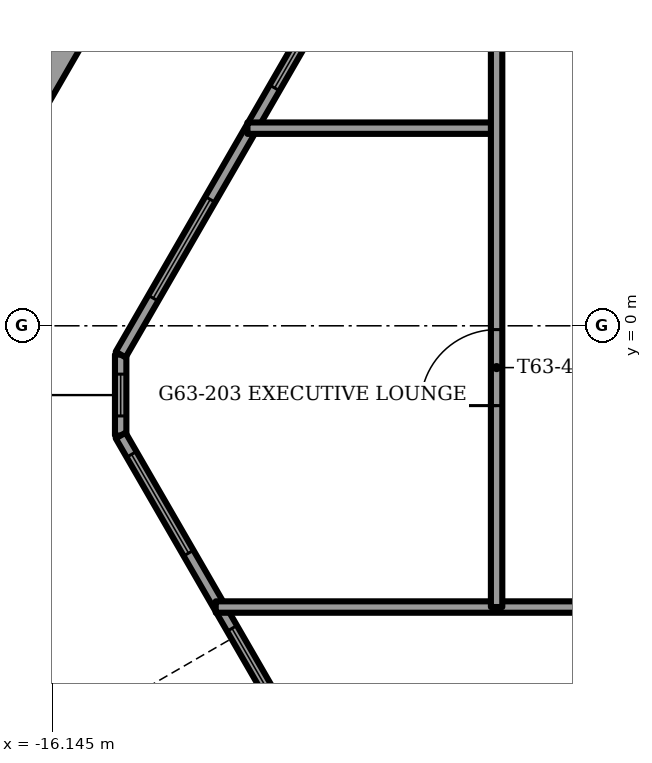
"""IFC4 building model, lengths in metres.
Left out: names, types, materials, properties, quantities, classifications, styles, units other than length and angle.
Written with IfcOpenShell. Run it as: python <this file> out.ifc"""

import sys

from ifc_helpers import new_model, si_unit, direction, frame, frame_2d, origin, place, context, subcontext, project, spatial, rectangle, extrude, element, fill, save


model = new_model("IFC4")
c1 = context("Model", 3, precision=1e-05, world=origin(), true_north=direction((0.0, 1.0)))
c2 = subcontext(c1, "Body", "Model", "MODEL_VIEW")
j1 = project(units=[si_unit("LENGTHUNIT", "METRE"), si_unit("PLANEANGLEUNIT", "RADIAN")], contexts=[c1])
p1 = place(None, origin())
s1 = spatial("IfcSite", under=j1, at=p1, CompositionType="ELEMENT")
p2 = place(p1, origin())
s2 = spatial("IfcBuilding", under=s1, at=p2, CompositionType="ELEMENT")
p3 = place(p2, frame((0.0, 0.0, 256.25)))
s3 = spatial("IfcBuildingStorey", under=s2, at=p3, CompositionType="ELEMENT", Elevation=256.25)
p4 = place(p3, frame((-15.678, 4.722, 0.0), z_axis=(0.0, 0.0, 1.0), x_axis=(-0.499996383721, -0.866027491634, 0.0)))
e1 = element("IfcWall", 1, at=p4, inside=s3, PredefinedType="PARAPET", context=c2, shape_type="SweptSolid", body=[
    extrude(rectangle(XDim=6.018, YDim=0.9, at=frame_2d((3.009, 0.0))), origin(), (0.0, 0.0, 1.0), 1.1),
])
p5 = place(p3, frame((-18.687, -1.333, 0.0), z_axis=(0.0, 0.0, 1.0), x_axis=(0.499971567444, -0.866041818706, 0.0)))
e2 = element("IfcWall", 2, at=p5, inside=s3, PredefinedType="PARAPET", context=c2, shape_type="SweptSolid", body=[
    extrude(rectangle(XDim=4.44, YDim=0.9, at=frame_2d((2.22, 0.0))), origin(), (0.0, 0.0, 1.0), 1.1),
])
p6 = place(p3, frame((-5.909, 15.792, 0.0), z_axis=(0.0, 0.0, 1.0), x_axis=(-0.500006153997, -0.866021850744, 0.0)))
e3 = element("IfcWall", 3, at=p6, inside=s3, PredefinedType="SOLIDWALL", context=c2, shape_type="SweptSolid", body=[
    extrude(rectangle(XDim=18.673, YDim=0.15, at=frame_2d((9.336, 0.0))), origin(), (0.0, 0.0, 1.0), 3.45),
])
p7 = place(p6, frame((2.838, 0.0, 0.15)))
e4 = element("IfcOpeningElement", 4, at=p7, cuts=e3, PredefinedType="OPENING", context=c2, shape_type="SweptSolid", body=[
    extrude(rectangle(XDim=1.5, YDim=2.85, at=frame_2d((0.75, 1.425))), frame((0.0, 0.075, 0.0), z_axis=(0.0, -1.0, 0.0), x_axis=(1.0, 0.0, 0.0)), (0.0, 0.0, 1.0), 0.15),
])
p8 = place(p6, frame((9.053, 0.0, 0.15)))
e5 = element("IfcOpeningElement", 5, at=p8, cuts=e3, PredefinedType="OPENING", context=c2, shape_type="SweptSolid", body=[
    extrude(rectangle(XDim=0.9, YDim=2.85, at=frame_2d((0.45, 1.425))), frame((0.0, 0.075, 0.0), z_axis=(0.0, -1.0, 0.0), x_axis=(1.0, 0.0, 0.0)), (0.0, 0.0, 1.0), 0.15),
])
p9 = place(p6, frame((6.953, 0.0, 0.15)))
e6 = element("IfcOpeningElement", 6, at=p9, cuts=e3, PredefinedType="OPENING", context=c2, shape_type="SweptSolid", body=[
    extrude(rectangle(XDim=1.4, YDim=2.85, at=frame_2d((0.7, 1.425))), frame((0.0, 0.075, 0.0), z_axis=(0.0, -1.0, 0.0), x_axis=(1.0, 0.0, 0.0)), (0.0, 0.0, 1.0), 0.15),
])
p10 = place(p6, frame((11.022, 0.0, 0.15)))
e7 = element("IfcOpeningElement", 7, at=p10, cuts=e3, PredefinedType="OPENING", context=c2, shape_type="SweptSolid", body=[
    extrude(rectangle(XDim=1.5, YDim=2.85, at=frame_2d((0.75, 1.425))), frame((0.0, 0.075, 0.0), z_axis=(0.0, -1.0, 0.0), x_axis=(1.0, 0.0, 0.0)), (0.0, 0.0, 1.0), 0.15),
])
p11 = place(p6, frame((13.222, 0.0, 0.15)))
e8 = element("IfcOpeningElement", 8, at=p11, cuts=e3, PredefinedType="OPENING", context=c2, shape_type="SweptSolid", body=[
    extrude(rectangle(XDim=1.4, YDim=2.85, at=frame_2d((0.7, 1.425))), frame((0.0, 0.075, 0.0), z_axis=(0.0, -1.0, 0.0), x_axis=(1.0, 0.0, 0.0)), (0.0, 0.0, 1.0), 0.15),
])
p12 = place(p6, frame((0.394, 0.0, 0.15)))
e9 = element("IfcOpeningElement", 9, at=p12, cuts=e3, PredefinedType="OPENING", context=c2, shape_type="SweptSolid", body=[
    extrude(rectangle(XDim=1.5, YDim=2.73, at=frame_2d((0.75, 1.365))), frame((0.0, 0.075, 0.0), z_axis=(0.0, -1.0, 0.0), x_axis=(1.0, 0.0, 0.0)), (0.0, 0.0, 1.0), 0.15),
])
p13 = place(p6, frame((16.316, 0.0, 0.15)))
e10 = element("IfcOpeningElement", 10, at=p13, cuts=e3, PredefinedType="OPENING", context=c2, shape_type="SweptSolid", body=[
    extrude(rectangle(XDim=1.5, YDim=2.73, at=frame_2d((0.75, 1.365))), frame((0.0, 0.075, 0.0), z_axis=(0.0, -1.0, 0.0), x_axis=(1.0, 0.0, 0.0)), (0.0, 0.0, 1.0), 0.15),
])
p14 = place(p3, frame((-15.246, -1.444, 0.0), z_axis=(0.0, 0.0, 1.0), x_axis=(0.500005990458, -0.866021945164, 0.0)))
e11 = element("IfcWall", 11, at=p14, inside=s3, PredefinedType="SOLIDWALL", context=c2, shape_type="SweptSolid", body=[
    extrude(rectangle(XDim=12.745, YDim=0.15, at=frame_2d((6.373, 0.0))), origin(), (0.0, 0.0, 1.0), 3.45),
])
p15 = place(p14, frame((2.93, 0.0, 0.15)))
e12 = element("IfcOpeningElement", 12, at=p15, cuts=e11, PredefinedType="OPENING", context=c2, shape_type="SweptSolid", body=[
    extrude(rectangle(XDim=1.5, YDim=2.85, at=frame_2d((0.75, 1.425))), frame((0.0, 0.075, 0.0), z_axis=(0.0, -1.0, 0.0), x_axis=(1.0, 0.0, 0.0)), (0.0, 0.0, 1.0), 0.15),
])
p16 = place(p14, frame((4.673, 0.0, 0.15)))
e13 = element("IfcOpeningElement", 13, at=p16, cuts=e11, PredefinedType="OPENING", context=c2, shape_type="SweptSolid", body=[
    extrude(rectangle(XDim=1.4, YDim=2.85, at=frame_2d((0.7, 1.425))), frame((0.0, 0.075, 0.0), z_axis=(0.0, -1.0, 0.0), x_axis=(1.0, 0.0, 0.0)), (0.0, 0.0, 1.0), 0.15),
])
p17 = place(p14, frame((6.673, 0.0, 0.15)))
e14 = element("IfcOpeningElement", 14, at=p17, cuts=e11, PredefinedType="OPENING", context=c2, shape_type="SweptSolid", body=[
    extrude(rectangle(XDim=1.5, YDim=2.85, at=frame_2d((0.75, 1.425))), frame((0.0, 0.075, 0.0), z_axis=(0.0, -1.0, 0.0), x_axis=(1.0, 0.0, 0.0)), (0.0, 0.0, 1.0), 0.15),
])
p18 = place(p14, frame((8.873, 0.0, 0.15)))
e15 = element("IfcOpeningElement", 15, at=p18, cuts=e11, PredefinedType="OPENING", context=c2, shape_type="SweptSolid", body=[
    extrude(rectangle(XDim=1.4, YDim=2.85, at=frame_2d((0.7, 1.425))), frame((0.0, 0.075, 0.0), z_axis=(0.0, -1.0, 0.0), x_axis=(1.0, 0.0, 0.0)), (0.0, 0.0, 1.0), 0.15),
])
p19 = place(p14, frame((0.286, 0.0, 0.15)))
e16 = element("IfcOpeningElement", 16, at=p19, cuts=e11, PredefinedType="OPENING", context=c2, shape_type="SweptSolid", body=[
    extrude(rectangle(XDim=1.5, YDim=2.73, at=frame_2d((0.75, 1.365))), frame((0.0, 0.075, 0.0), z_axis=(0.0, -1.0, 0.0), x_axis=(1.0, 0.0, 0.0)), (0.0, 0.0, 1.0), 0.15),
])
p20 = place(p3, frame((-15.246, -0.378, 0.0), z_axis=(0.0, 0.0, 1.0), x_axis=(0.0, -1.0, 0.0)))
e17 = element("IfcWall", 17, at=p20, inside=s3, PredefinedType="SOLIDWALL", context=c2, shape_type="SweptSolid", body=[
    extrude(rectangle(XDim=1.065, YDim=0.15, at=frame_2d((0.533, 0.0))), origin(), (0.0, 0.0, 1.0), 3.45),
])
p21 = place(p20, frame((0.258, 0.0, 0.15)))
e18 = element("IfcOpeningElement", 18, at=p21, cuts=e17, PredefinedType="OPENING", context=c2, shape_type="SweptSolid", body=[
    extrude(rectangle(XDim=0.55, YDim=2.85, at=frame_2d((0.275, 1.425))), frame((0.0, 0.075, 0.0), z_axis=(0.0, -1.0, 0.0), x_axis=(1.0, 0.0, 0.0)), (0.0, 0.0, 1.0), 0.15),
])
p22 = place(p3, frame((-13.995, -3.7, 0.0), z_axis=(0.0, 0.0, 1.0), x_axis=(1.0, 0.0, 0.0)))
e19 = element("IfcWall", 19, at=p22, inside=s3, PredefinedType="PARTITIONING", context=c2, shape_type="SweptSolid", body=[
    extrude(rectangle(XDim=19.785, YDim=0.15, at=frame_2d((9.893, 0.0))), origin(), (0.0, 0.0, 1.0), 3.45),
])
p23 = place(p22, frame((13.495, 0.0, 0.0)))
e20 = element("IfcOpeningElement", 20, at=p23, cuts=e19, PredefinedType="OPENING", context=c2, shape_type="SweptSolid", body=[
    extrude(rectangle(XDim=1.0, YDim=2.1, at=frame_2d((0.5, 1.05))), frame((0.0, 0.075, 0.0), z_axis=(0.0, -1.0, 0.0), x_axis=(1.0, 0.0, 0.0)), (0.0, 0.0, 1.0), 0.15),
])
p24 = place(p22, frame((7.27, 0.0, 0.0)))
e21 = element("IfcOpeningElement", 21, at=p24, cuts=e19, PredefinedType="OPENING", context=c2, shape_type="SweptSolid", body=[
    extrude(rectangle(XDim=1.0, YDim=2.1, at=frame_2d((0.5, 1.05))), frame((0.0, 0.075, 0.0), z_axis=(0.0, -1.0, 0.0), x_axis=(1.0, 0.0, 0.0)), (0.0, 0.0, 1.0), 0.15),
])
p25 = place(p22, frame((17.445, 0.0, 0.0)))
e22 = element("IfcOpeningElement", 22, at=p25, cuts=e19, PredefinedType="OPENING", context=c2, shape_type="SweptSolid", body=[
    extrude(rectangle(XDim=1.0, YDim=2.1, at=frame_2d((0.5, 1.05))), frame((0.0, 0.075, 0.0), z_axis=(0.0, -1.0, 0.0), x_axis=(1.0, 0.0, 0.0)), (0.0, 0.0, 1.0), 0.15),
])
p26 = place(p3, frame((-13.578, 2.6, 0.0), z_axis=(0.0, 0.0, 1.0), x_axis=(1.0, 0.0, 0.0)))
e23 = element("IfcWall", 23, at=p26, inside=s3, PredefinedType="PARTITIONING", context=c2, shape_type="SweptSolid", body=[
    extrude(rectangle(XDim=3.278, YDim=0.15, at=frame_2d((1.639, 0.0))), origin(), (0.0, 0.0, 1.0), 3.45),
])
p27 = place(p3, frame((-10.3, -3.7, 0.0), z_axis=(0.0, 0.0, 1.0), x_axis=(0.0, 1.0, 0.0)))
e24 = element("IfcWall", 24, at=p27, inside=s3, PredefinedType="PARTITIONING", context=c2, shape_type="SweptSolid", body=[
    extrude(rectangle(XDim=11.978, YDim=0.15, at=frame_2d((5.989, 0.0))), origin(), (0.0, 0.0, 1.0), 3.45),
])
p28 = place(p27, frame((2.65, 0.0, 0.0)))
e25 = element("IfcOpeningElement", 25, at=p28, cuts=e24, PredefinedType="OPENING", context=c2, shape_type="SweptSolid", body=[
    extrude(rectangle(XDim=1.0, YDim=2.1, at=frame_2d((0.5, 1.05))), frame((0.0, 0.075, 0.0), z_axis=(0.0, -1.0, 0.0), x_axis=(1.0, 0.0, 0.0)), (0.0, 0.0, 1.0), 0.15),
])
p29 = place(p27, frame((8.52, 0.0, 0.0)))
e26 = element("IfcOpeningElement", 26, at=p29, cuts=e24, PredefinedType="OPENING", context=c2, shape_type="SweptSolid", body=[
    extrude(rectangle(XDim=1.0, YDim=2.1, at=frame_2d((0.5, 1.05))), frame((0.0, 0.075, 0.0), z_axis=(0.0, -1.0, 0.0), x_axis=(1.0, 0.0, 0.0)), (0.0, 0.0, 1.0), 0.15),
])
p30 = place(p11, origin())
e27 = element("IfcWindow", 27, at=p30, inside=s3, PartitioningType="SINGLE_PANEL", PredefinedType="WINDOW", context=c2, shape_type="SweptSolid", body=[
    extrude(rectangle(XDim=1.4, YDim=2.85, at=frame_2d((0.7, 1.425))), frame((0.0, 0.03, 0.0), z_axis=(0.0, -1.0, 0.0), x_axis=(1.0, 0.0, 0.0)), (0.0, 0.0, 1.0), 0.06),
])
fill(e8, e27)
p31 = place(p13, origin())
e28 = element("IfcWindow", 28, at=p31, inside=s3, PartitioningType="SINGLE_PANEL", PredefinedType="WINDOW", context=c2, shape_type="SweptSolid", body=[
    extrude(rectangle(XDim=1.5, YDim=2.73, at=frame_2d((0.75, 1.365))), frame((0.0, 0.03, 0.0), z_axis=(0.0, -1.0, 0.0), x_axis=(1.0, 0.0, 0.0)), (0.0, 0.0, 1.0), 0.06),
])
fill(e10, e28)
p32 = place(p15, origin())
e29 = element("IfcWindow", 29, at=p32, inside=s3, PartitioningType="SINGLE_PANEL", PredefinedType="WINDOW", context=c2, shape_type="SweptSolid", body=[
    extrude(rectangle(XDim=1.5, YDim=2.85, at=frame_2d((0.75, 1.425))), frame((0.0, 0.03, 0.0), z_axis=(0.0, -1.0, 0.0), x_axis=(1.0, 0.0, 0.0)), (0.0, 0.0, 1.0), 0.06),
])
fill(e12, e29)
p33 = place(p19, origin())
e30 = element("IfcWindow", 30, at=p33, inside=s3, PartitioningType="SINGLE_PANEL", PredefinedType="WINDOW", context=c2, shape_type="SweptSolid", body=[
    extrude(rectangle(XDim=1.5, YDim=2.73, at=frame_2d((0.75, 1.365))), frame((0.0, 0.03, 0.0), z_axis=(0.0, -1.0, 0.0), x_axis=(1.0, 0.0, 0.0)), (0.0, 0.0, 1.0), 0.06),
])
fill(e16, e30)
p34 = place(p21, origin())
e31 = element("IfcWindow", 31, at=p34, inside=s3, PartitioningType="SINGLE_PANEL", PredefinedType="WINDOW", context=c2, shape_type="SweptSolid", body=[
    extrude(rectangle(XDim=0.55, YDim=2.85, at=frame_2d((0.275, 1.425))), frame((0.0, 0.03, 0.0), z_axis=(0.0, -1.0, 0.0), x_axis=(1.0, 0.0, 0.0)), (0.0, 0.0, 1.0), 0.06),
])
fill(e18, e31)
p35 = place(p28, origin())
e32 = element("IfcDoor", 32, at=p35, inside=s3, OperationType="SINGLE_SWING_RIGHT", PredefinedType="DOOR", context=c2, shape_type="SweptSolid", body=[
    extrude(rectangle(XDim=1.0, YDim=2.1, at=frame_2d((0.5, 1.05))), frame((0.0, 0.025, 0.0), z_axis=(0.0, -1.0, 0.0), x_axis=(1.0, 0.0, 0.0)), (0.0, 0.0, 1.0), 0.05),
])
fill(e25, e32)
save(model, sys.argv[1])
